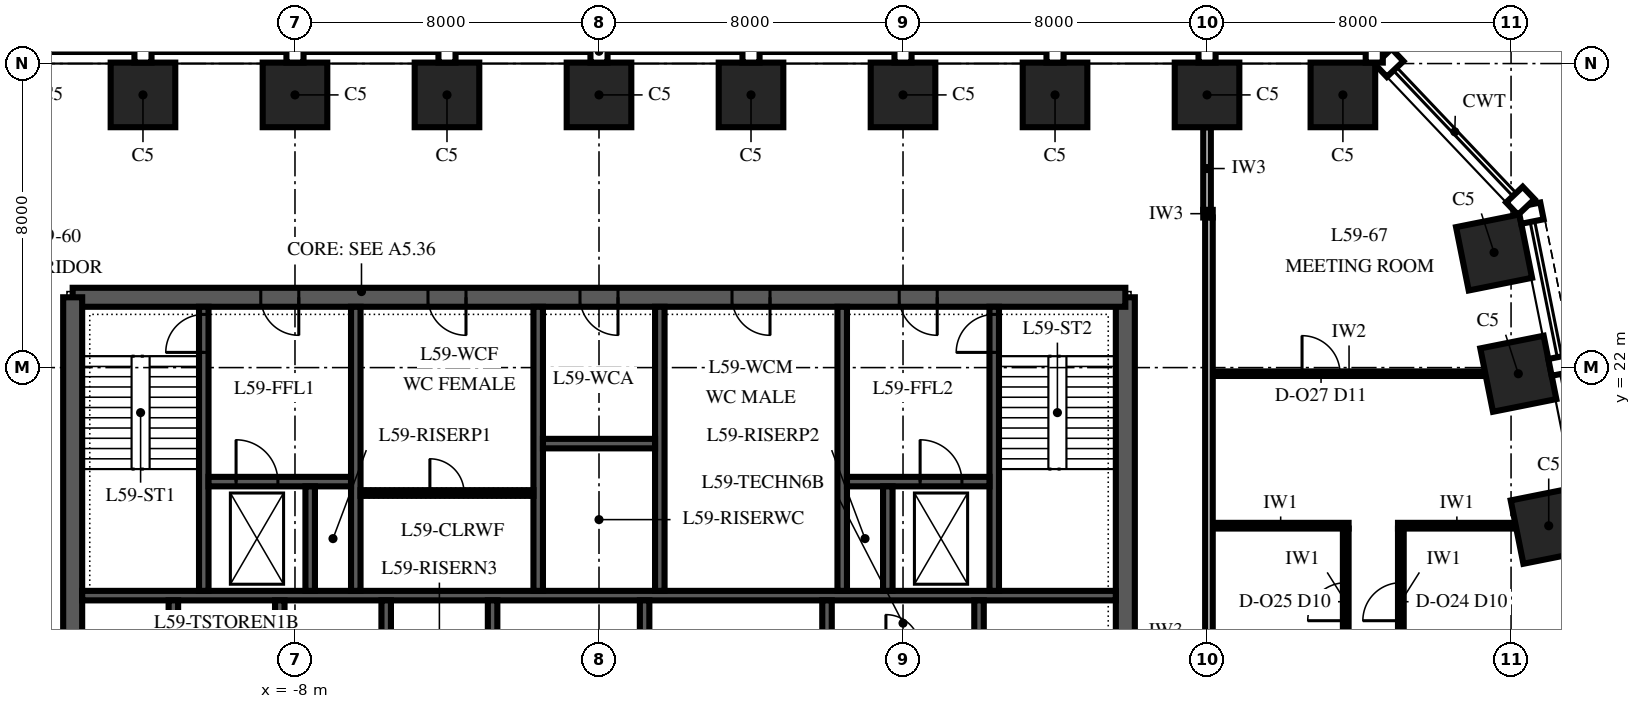
"""IFC4 building model, lengths in metres.
Left out: names, types, materials, properties, quantities, classifications, styles, units other than length and angle.
Written with IfcOpenShell. Run it as: python <this file> out.ifc"""

import sys

from ifc_helpers import new_model, si_unit, direction, frame, frame_2d, origin, origin_2d, place, context, subcontext, project, spatial, polyline, rectangle, outline, extrude, element, fill, save


model = new_model("IFC4")
c1 = context("Model", 3, precision=1e-05, world=origin(), true_north=direction((0.0, 1.0)))
c2 = subcontext(c1, "Body", "Model", "MODEL_VIEW")
j1 = project(units=[si_unit("LENGTHUNIT", "METRE"), si_unit("PLANEANGLEUNIT", "RADIAN")], contexts=[c1])
p1 = place(None, origin())
s1 = spatial("IfcSite", under=j1, at=p1, CompositionType="ELEMENT")
p2 = place(p1, origin())
s2 = spatial("IfcBuilding", under=s1, at=p2, CompositionType="ELEMENT")
p3 = place(p2, frame((0.0, 0.0, 256.0)))
s3 = spatial("IfcBuildingStorey", under=s2, at=p3, CompositionType="ELEMENT", Elevation=256.0)
for number, where, z_axis, x_axis in (
    (1, (24.991, 17.838, 0.0), (0.0, 0.0, 1.0), (-0.196, 0.981, 0.0)),
    (2, (24.191, 21.838, 0.0), (0.0, 0.0, 1.0), (-0.196, 0.981, 0.0)),
    (3, (23.553, 25.029, 0.0), (0.0, 0.0, 1.0), (-0.196, 0.981, 0.0)),
    (4, (19.575, 29.175, 0.0), (0.0, 0.0, 1.0), (-1.0, 0.0, 0.0)),
    (5, (16.0, 29.175, 0.0), (0.0, 0.0, 1.0), (-1.0, 0.0, 0.0)),
    (6, (12.0, 29.175, 0.0), (0.0, 0.0, 1.0), (-1.0, 0.0, 0.0)),
    (7, (8.0, 29.175, 0.0), (0.0, 0.0, 1.0), (-1.0, 0.0, 0.0)),
    (8, (4.0, 29.175, 0.0), (0.0, 0.0, 1.0), (-1.0, 0.0, 0.0)),
    (9, (0.0, 29.175, 0.0), (0.0, 0.0, 1.0), (-1.0, 0.0, 0.0)),
    (10, (-4.0, 29.175, 0.0), (0.0, 0.0, 1.0), (-1.0, 0.0, 0.0)),
    (11, (-8.0, 29.175, 0.0), (0.0, 0.0, 1.0), (-1.0, 0.0, 0.0)),
    (12, (-12.0, 29.175, 0.0), (0.0, 0.0, 1.0), (-1.0, 0.0, 0.0)),
):
    element("IfcColumn", number, at=place(p3, frame(where, z_axis=z_axis, x_axis=x_axis)), inside=s3, PredefinedType="COLUMN", context=c2, shape_type="SweptSolid", body=[
        extrude(rectangle(XDim=1.7, YDim=1.7, at=origin_2d()), origin(), (0.0, 0.0, 1.0), 4.0),
    ])
p4 = place(p3, frame((13.85, 6.15, 0.0), z_axis=(0.0, 0.0, 1.0), x_axis=(0.0, 1.0, 0.0)))
e13 = element("IfcWall", 13, at=p4, inside=s3, PredefinedType="SHEAR", context=c2, shape_type="SweptSolid", body=[
    extrude(outline(polyline([(0.0, -0.25), (17.7, -0.25), (17.7, 0.0), (17.45, 0.0), (17.45, 0.25), (0.25, 0.25), (0.25, 0.0), (0.0, 0.0), (0.0, -0.25)])), origin(), (0.0, 0.0, 1.0), 4.0),
])
p5 = place(p4, frame((4.15, 0.0, 0.0)))
e14 = element("IfcOpeningElement", 14, at=p5, cuts=e13, PredefinedType="OPENING", context=c2, shape_type="SweptSolid", body=[
    extrude(rectangle(XDim=1.8, YDim=2.4, at=frame_2d((0.9, 1.2))), frame((0.0, 0.265, 0.0), z_axis=(0.0, -1.0, 0.0), x_axis=(1.0, 0.0, 0.0)), (0.0, 0.0, 1.0), 0.53),
])
p6 = place(p3, frame((13.85, 23.85, 0.0), z_axis=(0.0, 0.0, 1.0), x_axis=(-1.0, 0.0, 0.0)))
e15 = element("IfcWall", 15, at=p6, inside=s3, PredefinedType="SHEAR", context=c2, shape_type="SweptSolid", body=[
    extrude(rectangle(XDim=27.7, YDim=0.5, at=frame_2d((13.85, 0.0))), origin(), (0.0, 0.0, 1.0), 4.0),
])
p7 = place(p6, frame((21.75, 0.0, 0.0)))
e16 = element("IfcOpeningElement", 16, at=p7, cuts=e15, PredefinedType="OPENING", context=c2, shape_type="SweptSolid", body=[
    extrude(rectangle(XDim=1.0, YDim=2.1, at=frame_2d((0.5, 1.05))), frame((0.0, 0.265, 0.0), z_axis=(0.0, -1.0, 0.0), x_axis=(1.0, 0.0, 0.0)), (0.0, 0.0, 1.0), 0.53),
])
p8 = place(p6, frame((4.95, 0.0, 0.0)))
e17 = element("IfcOpeningElement", 17, at=p8, cuts=e15, PredefinedType="OPENING", context=c2, shape_type="SweptSolid", body=[
    extrude(rectangle(XDim=1.0, YDim=2.1, at=frame_2d((0.5, 1.05))), frame((0.0, 0.265, 0.0), z_axis=(0.0, -1.0, 0.0), x_axis=(1.0, 0.0, 0.0)), (0.0, 0.0, 1.0), 0.53),
])
p9 = place(p6, frame((17.35, 0.0, 0.0)))
e18 = element("IfcOpeningElement", 18, at=p9, cuts=e15, PredefinedType="OPENING", context=c2, shape_type="SweptSolid", body=[
    extrude(rectangle(XDim=1.0, YDim=2.1, at=frame_2d((0.5, 1.05))), frame((0.0, 0.265, 0.0), z_axis=(0.0, -1.0, 0.0), x_axis=(1.0, 0.0, 0.0)), (0.0, 0.0, 1.0), 0.53),
])
p10 = place(p6, frame((13.35, 0.0, 0.0)))
e19 = element("IfcOpeningElement", 19, at=p10, cuts=e15, PredefinedType="OPENING", context=c2, shape_type="SweptSolid", body=[
    extrude(rectangle(XDim=1.0, YDim=2.1, at=frame_2d((0.5, 1.05))), frame((0.0, 0.265, 0.0), z_axis=(0.0, -1.0, 0.0), x_axis=(1.0, 0.0, 0.0)), (0.0, 0.0, 1.0), 0.53),
])
p11 = place(p6, frame((9.35, 0.0, 0.0)))
e20 = element("IfcOpeningElement", 20, at=p11, cuts=e15, PredefinedType="OPENING", context=c2, shape_type="SweptSolid", body=[
    extrude(rectangle(XDim=1.0, YDim=2.1, at=frame_2d((0.5, 1.05))), frame((0.0, 0.265, 0.0), z_axis=(0.0, -1.0, 0.0), x_axis=(1.0, 0.0, 0.0)), (0.0, 0.0, 1.0), 0.53),
])
p12 = place(p3, frame((-13.85, 23.85, 0.0), z_axis=(0.0, 0.0, 1.0), x_axis=(0.0, -1.0, 0.0)))
e21 = element("IfcWall", 21, at=p12, inside=s3, PredefinedType="SHEAR", context=c2, shape_type="SweptSolid", body=[
    extrude(outline(polyline([(0.0, -0.25), (17.7, -0.25), (17.7, 0.0), (17.45, 0.0), (17.45, 0.25), (0.25, 0.25), (0.25, 0.0), (0.0, 0.0), (0.0, -0.25)])), origin(), (0.0, 0.0, 1.0), 4.0),
])
p13 = place(p12, frame((11.75, 0.0, 0.0)))
e22 = element("IfcOpeningElement", 22, at=p13, cuts=e21, PredefinedType="OPENING", context=c2, shape_type="SweptSolid", body=[
    extrude(rectangle(XDim=1.8, YDim=2.4, at=frame_2d((0.9, 1.2))), frame((0.0, 0.265, 0.0), z_axis=(0.0, -1.0, 0.0), x_axis=(1.0, 0.0, 0.0)), (0.0, 0.0, 1.0), 0.53),
])
p14 = place(p3, frame((-13.6, 16.0, 0.0), z_axis=(0.0, 0.0, 1.0), x_axis=(1.0, 0.0, 0.0)))
e23 = element("IfcWall", 23, at=p14, inside=s3, PredefinedType="SHEAR", context=c2, shape_type="SweptSolid", body=[
    extrude(rectangle(XDim=27.2, YDim=0.25, at=frame_2d((13.6, 0.0))), origin(), (0.0, 0.0, 1.0), 4.0),
])
for number, where, z_axis, x_axis in (
    (24, (-11.2, 13.125, 0.0), (0.0, 0.0, 1.0), (0.0, 1.0, 0.0)),
    (25, (-8.4, 13.125, 0.0), (0.0, 0.0, 1.0), (0.0, 1.0, 0.0)),
    (26, (-5.6, 13.125, 0.0), (0.0, 0.0, 1.0), (0.0, 1.0, 0.0)),
    (27, (-2.8, 13.125, 0.0), (0.0, 0.0, 1.0), (0.0, 1.0, 0.0)),
    (28, (1.2, 13.125, 0.0), (0.0, 0.0, 1.0), (0.0, 1.0, 0.0)),
    (29, (6.0, 13.125, 0.0), (0.0, 0.0, 1.0), (0.0, 1.0, 0.0)),
    (30, (10.0, 13.125, 0.0), (0.0, 0.0, 1.0), (0.0, 1.0, 0.0)),
):
    element("IfcWall", number, at=place(p3, frame(where, z_axis=z_axis, x_axis=x_axis)), inside=s3, PredefinedType="SHEAR", context=c2, shape_type="SweptSolid", body=[
        extrude(rectangle(XDim=2.75, YDim=0.25, at=frame_2d((1.375, 0.0))), origin(), (0.0, 0.0, 1.0), 4.0),
    ])
p15 = place(p3, frame((-10.4, 16.125, 0.0), z_axis=(0.0, 0.0, 1.0), x_axis=(0.0, 1.0, 0.0)))
e31 = element("IfcWall", 31, at=p15, inside=s3, PredefinedType="SHEAR", context=c2, shape_type="SweptSolid", body=[
    extrude(rectangle(XDim=7.475, YDim=0.25, at=frame_2d((3.738, 0.0))), origin(), (0.0, 0.0, 1.0), 4.0),
])
p16 = place(p15, frame((6.275, 0.0, 0.0)))
e32 = element("IfcOpeningElement", 32, at=p16, cuts=e31, PredefinedType="OPENING", context=c2, shape_type="SweptSolid", body=[
    extrude(rectangle(XDim=1.0, YDim=2.1, at=frame_2d((0.5, 1.05))), frame((0.0, 0.14, 0.0), z_axis=(0.0, -1.0, 0.0), x_axis=(1.0, 0.0, 0.0)), (0.0, 0.0, 1.0), 0.28),
])
for number, where, z_axis, x_axis in (
    (33, (-6.4, 16.125, 0.0), (0.0, 0.0, 1.0), (0.0, 1.0, 0.0)),
    (34, (-1.6, 16.125, 0.0), (0.0, 0.0, 1.0), (0.0, 1.0, 0.0)),
    (35, (1.6, 16.125, 0.0), (0.0, 0.0, 1.0), (0.0, 1.0, 0.0)),
    (36, (6.4, 16.125, 0.0), (0.0, 0.0, 1.0), (0.0, 1.0, 0.0)),
):
    element("IfcWall", number, at=place(p3, frame(where, z_axis=z_axis, x_axis=x_axis)), inside=s3, PredefinedType="SHEAR", context=c2, shape_type="SweptSolid", body=[
        extrude(rectangle(XDim=7.475, YDim=0.25, at=frame_2d((3.738, 0.0))), origin(), (0.0, 0.0, 1.0), 4.0),
    ])
p17 = place(p3, frame((10.4, 16.125, 0.0), z_axis=(0.0, 0.0, 1.0), x_axis=(0.0, 1.0, 0.0)))
e37 = element("IfcWall", 37, at=p17, inside=s3, PredefinedType="SHEAR", context=c2, shape_type="SweptSolid", body=[
    extrude(rectangle(XDim=7.475, YDim=0.25, at=frame_2d((3.738, 0.0))), origin(), (0.0, 0.0, 1.0), 4.0),
])
p18 = place(p17, frame((6.275, 0.0, 0.0)))
e38 = element("IfcOpeningElement", 38, at=p18, cuts=e37, PredefinedType="OPENING", context=c2, shape_type="SweptSolid", body=[
    extrude(rectangle(XDim=1.0, YDim=2.1, at=frame_2d((0.5, 1.05))), frame((0.0, 0.14, 0.0), z_axis=(0.0, -1.0, 0.0), x_axis=(1.0, 0.0, 0.0)), (0.0, 0.0, 1.0), 0.28),
])
p19 = place(p3, frame((-10.275, 19.0, 0.0), z_axis=(0.0, 0.0, 1.0), x_axis=(1.0, 0.0, 0.0)))
e39 = element("IfcWall", 39, at=p19, inside=s3, PredefinedType="SHEAR", context=c2, shape_type="SweptSolid", body=[
    extrude(rectangle(XDim=3.75, YDim=0.25, at=frame_2d((1.875, 0.0))), origin(), (0.0, 0.0, 1.0), 4.0),
])
p20 = place(p19, frame((0.725, 0.0, 0.0)))
e40 = element("IfcOpeningElement", 40, at=p20, cuts=e39, PredefinedType="OPENING", context=c2, shape_type="SweptSolid", body=[
    extrude(rectangle(XDim=1.1, YDim=2.1, at=frame_2d((0.55, 1.05))), frame((0.0, 0.14, 0.0), z_axis=(0.0, -1.0, 0.0), x_axis=(1.0, 0.0, 0.0)), (0.0, 0.0, 1.0), 0.28),
])
p21 = place(p3, frame((6.525, 19.0, 0.0), z_axis=(0.0, 0.0, 1.0), x_axis=(1.0, 0.0, 0.0)))
e41 = element("IfcWall", 41, at=p21, inside=s3, PredefinedType="SHEAR", context=c2, shape_type="SweptSolid", body=[
    extrude(rectangle(XDim=3.75, YDim=0.25, at=frame_2d((1.875, 0.0))), origin(), (0.0, 0.0, 1.0), 4.0),
])
p22 = place(p21, frame((1.925, 0.0, 0.0)))
e42 = element("IfcOpeningElement", 42, at=p22, cuts=e41, PredefinedType="OPENING", context=c2, shape_type="SweptSolid", body=[
    extrude(rectangle(XDim=1.1, YDim=2.1, at=frame_2d((0.55, 1.05))), frame((0.0, 0.14, 0.0), z_axis=(0.0, -1.0, 0.0), x_axis=(1.0, 0.0, 0.0)), (0.0, 0.0, 1.0), 0.28),
])
for number, where, z_axis, x_axis in (
    (43, (-7.6, 16.125, 0.0), (0.0, 0.0, 1.0), (0.0, 1.0, 0.0)),
    (44, (7.6, 16.125, 0.0), (0.0, 0.0, 1.0), (0.0, 1.0, 0.0)),
):
    element("IfcWall", number, at=place(p3, frame(where, z_axis=z_axis, x_axis=x_axis)), inside=s3, PredefinedType="SHEAR", context=c2, shape_type="SweptSolid", body=[
        extrude(rectangle(XDim=2.75, YDim=0.25, at=frame_2d((1.375, 0.0))), origin(), (0.0, 0.0, 1.0), 4.0),
    ])
p23 = place(p3, frame((-1.475, 20.0, 0.0), z_axis=(0.0, 0.0, 1.0), x_axis=(1.0, 0.0, 0.0)))
e45 = element("IfcWall", 45, at=p23, inside=s3, PredefinedType="SHEAR", context=c2, shape_type="SweptSolid", body=[
    extrude(rectangle(XDim=2.95, YDim=0.25, at=frame_2d((1.475, 0.0))), origin(), (0.0, 0.0, 1.0), 4.0),
])
p24 = place(p3, frame((-6.275, 18.7, 0.0), z_axis=(0.0, 0.0, 1.0), x_axis=(1.0, 0.0, 0.0)))
e46 = element("IfcWall", 46, at=p24, inside=s3, PredefinedType="PARTITIONING", context=c2, shape_type="SweptSolid", body=[
    extrude(rectangle(XDim=4.55, YDim=0.15, at=frame_2d((2.275, 0.0))), origin(), (0.0, 0.0, 1.0), 3.85),
])
p25 = place(p24, frame((1.825, 0.0, 0.0)))
e47 = element("IfcOpeningElement", 47, at=p25, cuts=e46, PredefinedType="OPENING", context=c2, shape_type="SweptSolid", body=[
    extrude(rectangle(XDim=0.9, YDim=2.1, at=frame_2d((0.45, 1.05))), frame((0.0, 0.09, 0.0), z_axis=(0.0, -1.0, 0.0), x_axis=(1.0, 0.0, 0.0)), (0.0, 0.0, 1.0), 0.18),
])
p26 = place(p3, frame((16.15, 17.84, 0.0), z_axis=(0.0, 0.0, 1.0), x_axis=(1.0, 0.0, 0.0)))
e48 = element("IfcWall", 48, at=p26, inside=s3, PredefinedType="PARTITIONING", context=c2, shape_type="SweptSolid", body=[
    extrude(rectangle(XDim=3.575, YDim=0.15, at=frame_2d((1.788, 0.0))), origin(), (0.0, 0.0, 1.0), 3.23),
])
p27 = place(p3, frame((21.025, 17.84, 0.0), z_axis=(0.0, 0.0, 1.0), x_axis=(1.0, 0.0, 0.0)))
e49 = element("IfcWall", 49, at=p27, inside=s3, PredefinedType="PARTITIONING", context=c2, shape_type="SweptSolid", body=[
    extrude(rectangle(XDim=3.099, YDim=0.15, at=frame_2d((1.549, 0.0))), origin(), (0.0, 0.0, 1.0), 3.23),
])
p28 = place(p3, frame((16.15, 21.84, 0.0), z_axis=(0.0, 0.0, 1.0), x_axis=(1.0, 0.0, 0.0)))
e50 = element("IfcWall", 50, at=p28, inside=s3, PredefinedType="PARTITIONING", context=c2, shape_type="SweptSolid", body=[
    extrude(rectangle(XDim=7.174, YDim=0.12, at=frame_2d((3.587, 0.0))), origin(), (0.0, 0.0, 1.0), 3.23),
])
p29 = place(p28, frame((2.35, 0.0, 0.0)))
e51 = element("IfcOpeningElement", 51, at=p29, cuts=e50, PredefinedType="OPENING", context=c2, shape_type="SweptSolid", body=[
    extrude(rectangle(XDim=1.0, YDim=2.4, at=frame_2d((0.5, 1.2))), frame((0.0, 0.075, 0.0), z_axis=(0.0, -1.0, 0.0), x_axis=(1.0, 0.0, 0.0)), (0.0, 0.0, 1.0), 0.15),
])
p30 = place(p3, frame((15.9, 26.05, 0.0), z_axis=(0.0, 0.0, 1.0), x_axis=(1.0, 0.0, 0.0)))
e52 = element("IfcWall", 52, at=p30, inside=s3, PredefinedType="PARTITIONING", context=c2, shape_type="SweptSolid", body=[
    extrude(rectangle(XDim=0.25, YDim=0.2, at=frame_2d((0.125, 0.0))), origin(), (0.0, 0.0, 1.0), 3.418),
])
p31 = place(p3, frame((16.0, 26.15, 0.0), z_axis=(0.0, 0.0, 1.0), x_axis=(0.0, 1.0, 0.0)))
e53 = element("IfcWall", 53, at=p31, inside=s3, PredefinedType="PARTITIONING", context=c2, shape_type="SweptSolid", body=[
    extrude(rectangle(XDim=2.175, YDim=0.2, at=frame_2d((1.087, 0.0))), origin(), (0.0, 0.0, 1.0), 3.418),
])
p32 = place(p3, frame((16.05, 1.94, 0.0), z_axis=(0.0, 0.0, 1.0), x_axis=(0.0, 1.0, 0.0)))
e54 = element("IfcWall", 54, at=p32, inside=s3, PredefinedType="PARTITIONING", context=c2, shape_type="SweptSolid", body=[
    extrude(rectangle(XDim=24.01, YDim=0.2, at=frame_2d((12.005, 0.0))), origin(), (0.0, 0.0, 1.0), 2.842),
])
p33 = place(p32, frame((8.46, 0.0, 0.0)))
e55 = element("IfcOpeningElement", 55, at=p33, cuts=e54, PredefinedType="OPENING", context=c2, shape_type="SweptSolid", body=[
    extrude(rectangle(XDim=1.2, YDim=2.4, at=frame_2d((0.6, 1.2))), frame((0.0, 0.115, 0.0), z_axis=(0.0, -1.0, 0.0), x_axis=(1.0, 0.0, 0.0)), (0.0, 0.0, 1.0), 0.23),
])
p34 = place(p3, frame((19.65, 13.915, 0.0), z_axis=(0.0, 0.0, 1.0), x_axis=(0.0, 1.0, 0.0)))
e56 = element("IfcWall", 56, at=p34, inside=s3, PredefinedType="PARTITIONING", context=c2, shape_type="SweptSolid", body=[
    extrude(rectangle(XDim=3.85, YDim=0.15, at=frame_2d((1.925, 0.0))), origin(), (0.0, 0.0, 1.0), 3.23),
])
p35 = place(p34, frame((1.425, 0.0, 0.0)))
e57 = element("IfcOpeningElement", 57, at=p35, cuts=e56, PredefinedType="OPENING", context=c2, shape_type="SweptSolid", body=[
    extrude(rectangle(XDim=1.0, YDim=2.3, at=frame_2d((0.5, 1.15))), frame((0.0, 0.09, 0.0), z_axis=(0.0, -1.0, 0.0), x_axis=(1.0, 0.0, 0.0)), (0.0, 0.0, 1.0), 0.18),
])
p36 = place(p3, frame((21.1, 13.915, 0.0), z_axis=(0.0, 0.0, 1.0), x_axis=(0.0, 1.0, 0.0)))
e58 = element("IfcWall", 58, at=p36, inside=s3, PredefinedType="PARTITIONING", context=c2, shape_type="SweptSolid", body=[
    extrude(rectangle(XDim=3.85, YDim=0.15, at=frame_2d((1.925, 0.0))), origin(), (0.0, 0.0, 1.0), 3.23),
])
p37 = place(p36, frame((1.425, 0.0, 0.0)))
e59 = element("IfcOpeningElement", 59, at=p37, cuts=e58, PredefinedType="OPENING", context=c2, shape_type="SweptSolid", body=[
    extrude(rectangle(XDim=1.0, YDim=2.3, at=frame_2d((0.5, 1.15))), frame((0.0, 0.09, 0.0), z_axis=(0.0, -1.0, 0.0), x_axis=(1.0, 0.0, 0.0)), (0.0, 0.0, 1.0), 0.18),
])
p38 = place(p7, origin())
e60 = element("IfcDoor", 60, at=p38, inside=s3, OperationType="SINGLE_SWING_RIGHT", PredefinedType="DOOR", context=c2, shape_type="SweptSolid", body=[
    extrude(rectangle(XDim=1.0, YDim=2.1, at=frame_2d((0.5, 1.05))), frame((0.0, 0.25, 0.0), z_axis=(0.0, -1.0, 0.0), x_axis=(1.0, 0.0, 0.0)), (0.0, 0.0, 1.0), 0.5),
])
fill(e16, e60)
p39 = place(p8, origin())
e61 = element("IfcDoor", 61, at=p39, inside=s3, OperationType="SINGLE_SWING_RIGHT", PredefinedType="DOOR", context=c2, shape_type="SweptSolid", body=[
    extrude(rectangle(XDim=1.0, YDim=2.1, at=frame_2d((0.5, 1.05))), frame((0.0, 0.25, 0.0), z_axis=(0.0, -1.0, 0.0), x_axis=(1.0, 0.0, 0.0)), (0.0, 0.0, 1.0), 0.5),
])
fill(e17, e61)
p40 = place(p9, origin())
e62 = element("IfcDoor", 62, at=p40, inside=s3, OperationType="SINGLE_SWING_LEFT", PredefinedType="DOOR", context=c2, shape_type="SweptSolid", body=[
    extrude(rectangle(XDim=1.0, YDim=2.1, at=frame_2d((0.5, 1.05))), frame((0.0, 0.25, 0.0), z_axis=(0.0, -1.0, 0.0), x_axis=(1.0, 0.0, 0.0)), (0.0, 0.0, 1.0), 0.5),
])
fill(e18, e62)
p41 = place(p10, origin())
e63 = element("IfcDoor", 63, at=p41, inside=s3, OperationType="SINGLE_SWING_LEFT", PredefinedType="DOOR", context=c2, shape_type="SweptSolid", body=[
    extrude(rectangle(XDim=1.0, YDim=2.1, at=frame_2d((0.5, 1.05))), frame((0.0, 0.25, 0.0), z_axis=(0.0, -1.0, 0.0), x_axis=(1.0, 0.0, 0.0)), (0.0, 0.0, 1.0), 0.5),
])
fill(e19, e63)
p42 = place(p11, origin())
e64 = element("IfcDoor", 64, at=p42, inside=s3, OperationType="SINGLE_SWING_LEFT", PredefinedType="DOOR", context=c2, shape_type="SweptSolid", body=[
    extrude(rectangle(XDim=1.0, YDim=2.1, at=frame_2d((0.5, 1.05))), frame((0.0, 0.25, 0.0), z_axis=(0.0, -1.0, 0.0), x_axis=(1.0, 0.0, 0.0)), (0.0, 0.0, 1.0), 0.5),
])
fill(e20, e64)
p43 = place(p16, origin())
e65 = element("IfcDoor", 65, at=p43, inside=s3, OperationType="SINGLE_SWING_LEFT", PredefinedType="DOOR", context=c2, shape_type="SweptSolid", body=[
    extrude(rectangle(XDim=1.0, YDim=2.1, at=frame_2d((0.5, 1.05))), frame((0.0, 0.125, 0.0), z_axis=(0.0, -1.0, 0.0), x_axis=(1.0, 0.0, 0.0)), (0.0, 0.0, 1.0), 0.25),
])
fill(e32, e65)
p44 = place(p18, origin())
e66 = element("IfcDoor", 66, at=p44, inside=s3, OperationType="SINGLE_SWING_LEFT", PredefinedType="DOOR", context=c2, shape_type="SweptSolid", body=[
    extrude(rectangle(XDim=1.0, YDim=2.1, at=frame_2d((0.5, 1.05))), frame((0.0, 0.125, 0.0), z_axis=(0.0, -1.0, 0.0), x_axis=(1.0, 0.0, 0.0)), (0.0, 0.0, 1.0), 0.25),
])
fill(e38, e66)
p45 = place(p22, origin())
e67 = element("IfcDoor", 67, at=p45, inside=s3, OperationType="SLIDING_TO_RIGHT", PredefinedType="DOOR", context=c2, shape_type="SweptSolid", body=[
    extrude(rectangle(XDim=1.1, YDim=2.1, at=frame_2d((0.55, 1.05))), frame((0.0, 0.125, 0.0), z_axis=(0.0, -1.0, 0.0), x_axis=(1.0, 0.0, 0.0)), (0.0, 0.0, 1.0), 0.25),
])
fill(e42, e67)
p46 = place(p20, origin())
e68 = element("IfcDoor", 68, at=p46, inside=s3, OperationType="SLIDING_TO_RIGHT", PredefinedType="DOOR", context=c2, shape_type="SweptSolid", body=[
    extrude(rectangle(XDim=1.1, YDim=2.1, at=frame_2d((0.55, 1.05))), frame((0.0, 0.125, 0.0), z_axis=(0.0, -1.0, 0.0), x_axis=(1.0, 0.0, 0.0)), (0.0, 0.0, 1.0), 0.25),
])
fill(e40, e68)
p47 = place(p25, origin())
e69 = element("IfcDoor", 69, at=p47, inside=s3, OperationType="SINGLE_SWING_LEFT", PredefinedType="DOOR", context=c2, shape_type="SweptSolid", body=[
    extrude(rectangle(XDim=0.9, YDim=2.1, at=frame_2d((0.45, 1.05))), frame((0.0, 0.075, 0.0), z_axis=(0.0, -1.0, 0.0), x_axis=(1.0, 0.0, 0.0)), (0.0, 0.0, 1.0), 0.149),
])
fill(e47, e69)
p48 = place(p37, origin())
e70 = element("IfcDoor", 70, at=p48, inside=s3, OperationType="SINGLE_SWING_LEFT", PredefinedType="DOOR", context=c2, shape_type="SweptSolid", body=[
    extrude(rectangle(XDim=1.0, YDim=2.3, at=frame_2d((0.5, 1.15))), frame((0.0, 0.075, 0.0), z_axis=(0.0, -1.0, 0.0), x_axis=(1.0, 0.0, 0.0)), (0.0, 0.0, 1.0), 0.149),
])
fill(e59, e70)
p49 = place(p35, origin())
e71 = element("IfcDoor", 71, at=p49, inside=s3, OperationType="SINGLE_SWING_LEFT", PredefinedType="DOOR", context=c2, shape_type="SweptSolid", body=[
    extrude(rectangle(XDim=1.0, YDim=2.3, at=frame_2d((0.5, 1.15))), frame((0.0, 0.075, 0.0), z_axis=(0.0, -1.0, 0.0), x_axis=(1.0, 0.0, 0.0)), (0.0, 0.0, 1.0), 0.149),
])
fill(e57, e71)
p50 = place(p29, origin())
e72 = element("IfcDoor", 72, at=p50, inside=s3, OperationType="SINGLE_SWING_RIGHT", PredefinedType="DOOR", context=c2, shape_type="SweptSolid", body=[
    extrude(rectangle(XDim=1.0, YDim=2.4, at=frame_2d((0.5, 1.2))), frame((0.0, 0.06, 0.0), z_axis=(0.0, -1.0, 0.0), x_axis=(1.0, 0.0, 0.0)), (0.0, 0.0, 1.0), 0.12),
])
fill(e51, e72)
save(model, sys.argv[1])
